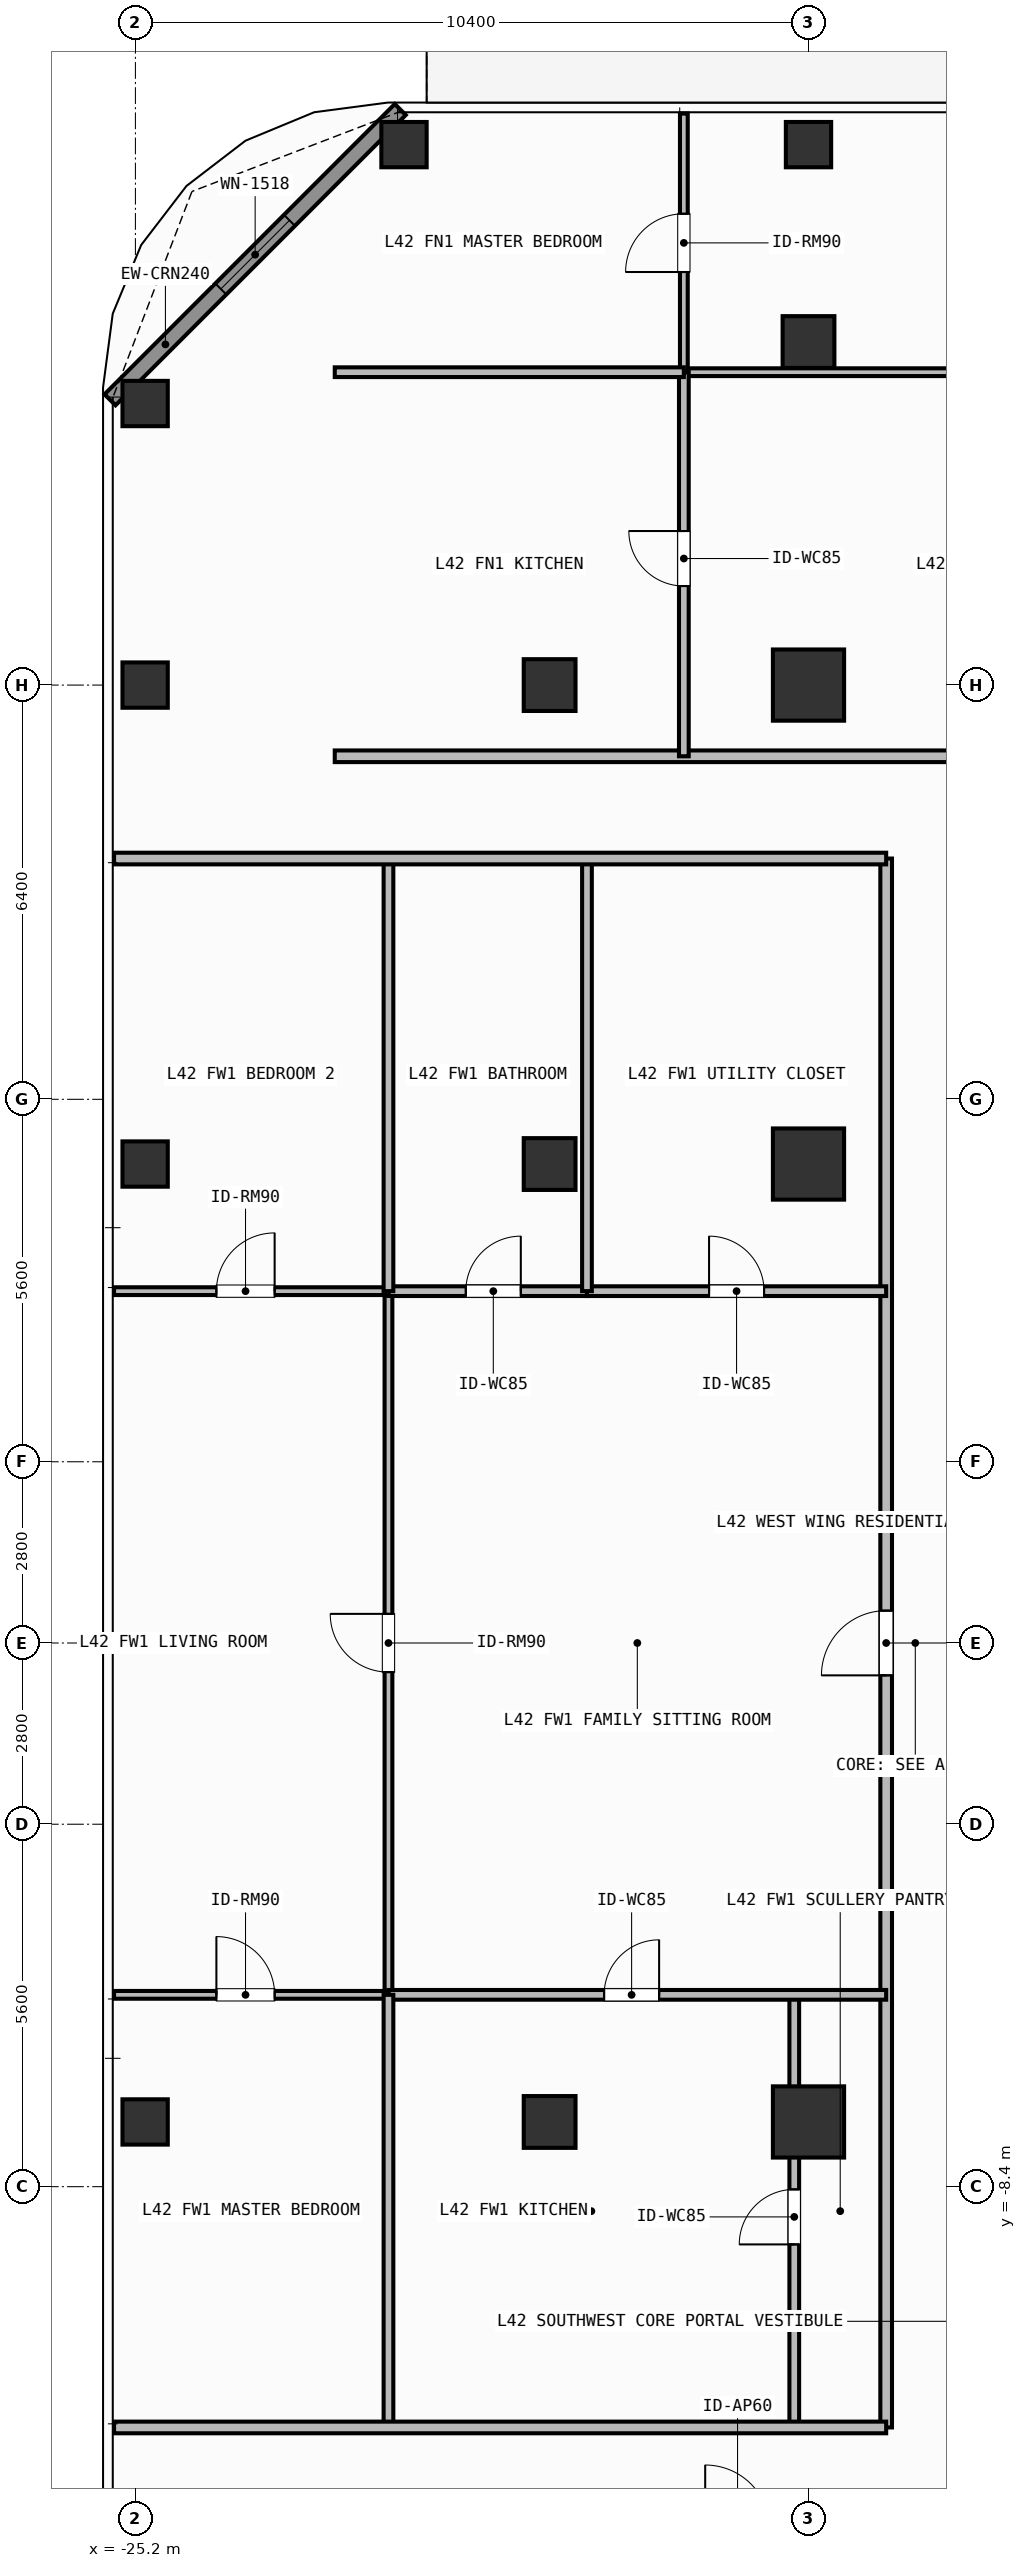
"""IFC4 building model, lengths in metres.
Left out: names, types, materials, properties, quantities, classifications, styles, units other than length and angle.
Written with IfcOpenShell. Run it as: python <this file> out.ifc"""

import sys

from ifc_helpers import new_model, si_unit, direction, frame, frame_2d, origin, origin_2d, place, context, subcontext, project, spatial, rectangle, hollow_rectangle, extrude, element, fill, save


model = new_model("IFC4")
c1 = context("Model", 3, precision=1e-05, world=origin(), true_north=direction((0.0, 1.0)))
c2 = subcontext(c1, "Body", "Model", "MODEL_VIEW")
j1 = project(units=[si_unit("LENGTHUNIT", "METRE"), si_unit("PLANEANGLEUNIT", "RADIAN")], contexts=[c1])
p1 = place(None, origin())
s1 = spatial("IfcSite", under=j1, at=p1, CompositionType="ELEMENT")
p2 = place(p1, origin())
s2 = spatial("IfcBuilding", under=s1, at=p2, CompositionType="ELEMENT")
p3 = place(p2, frame((0.0, 0.0, 171.9)))
s3 = spatial("IfcBuildingStorey", under=s2, at=p3, CompositionType="ELEMENT", Elevation=171.9)
for number, where, z_axis, x_axis in (
    (1, (-14.8, 14.8, 0.0), (0.0, 0.0, 1.0), (1.0, 0.0, 0.0)),
    (2, (-14.8, -7.4, 0.0), (0.0, 0.0, 1.0), (1.0, 0.0, 0.0)),
    (3, (-14.8, 7.4, 0.0), (0.0, 0.0, 1.0), (1.0, 0.0, 0.0)),
):
    element("IfcColumn", number, at=place(p3, frame(where, z_axis=z_axis, x_axis=x_axis)), inside=s3, PredefinedType="COLUMN", context=c2, shape_type="SweptSolid", body=[
        extrude(rectangle(XDim=1.1, YDim=1.1, at=origin_2d()), origin(), (0.0, 0.0, 1.0), 3.9),
    ])
for number, where, z_axis, x_axis in (
    (4, (-18.8, -7.4, 0.0), (0.0, 0.0, 1.0), (1.0, 0.0, 0.0)),
    (5, (-18.8, 7.4, 0.0), (0.0, 0.0, 1.0), (1.0, 0.0, 0.0)),
    (6, (-18.8, 14.8, 0.0), (0.0, 0.0, 1.0), (1.0, 0.0, 0.0)),
    (7, (-14.8, 20.1, 0.0), (0.0, 0.0, 1.0), (1.0, 0.0, 0.0)),
):
    element("IfcColumn", number, at=place(p3, frame(where, z_axis=z_axis, x_axis=x_axis)), inside=s3, PredefinedType="COLUMN", context=c2, shape_type="SweptSolid", body=[
        extrude(hollow_rectangle(XDim=0.8, YDim=0.8, WallThickness=0.036, at=origin_2d()), origin(), (0.0, 0.0, 1.0), 3.9),
    ])
for number, where, z_axis, x_axis in (
    (8, (-21.05, 23.15, 0.0), (0.0, 0.0, 1.0), (1.0, 0.0, 0.0)),
    (9, (-25.05, 19.15, 0.0), (0.0, 0.0, 1.0), (1.0, 0.0, 0.0)),
    (10, (-14.8, 23.15, 0.0), (0.0, 0.0, 1.0), (1.0, 0.0, 0.0)),
    (11, (-25.05, -7.4, 0.0), (0.0, 0.0, 1.0), (1.0, 0.0, 0.0)),
    (12, (-25.05, 7.4, 0.0), (0.0, 0.0, 1.0), (1.0, 0.0, 0.0)),
    (13, (-25.05, 14.8, 0.0), (0.0, 0.0, 1.0), (1.0, 0.0, 0.0)),
):
    element("IfcColumn", number, at=place(p3, frame(where, z_axis=z_axis, x_axis=x_axis)), inside=s3, PredefinedType="COLUMN", context=c2, shape_type="SweptSolid", body=[
        extrude(hollow_rectangle(XDim=0.7, YDim=0.7, WallThickness=0.032, at=origin_2d()), origin(), (0.0, 0.0, 1.0), 3.9),
    ])
p4 = place(p3, frame((-25.592, 19.208, 0.0), z_axis=(0.0, 0.0, 1.0), x_axis=(0.707087534163, 0.707126027686, 0.0)))
e14 = element("IfcWall", 14, at=p4, inside=s3, PredefinedType="SOLIDWALL", context=c2, shape_type="SweptSolid", body=[
    extrude(rectangle(XDim=6.342, YDim=0.24, at=frame_2d((3.171, 0.0))), origin(), (0.0, 0.0, 1.0), 3.68),
])
p5 = place(p4, frame((2.421, 0.0, 0.8)))
e15 = element("IfcOpeningElement", 15, at=p5, cuts=e14, PredefinedType="OPENING", context=c2, shape_type="SweptSolid", body=[
    extrude(rectangle(XDim=1.5, YDim=1.85, at=frame_2d((0.75, 0.925))), frame((0.0, 0.13, 0.0), z_axis=(0.0, -1.0, 0.0), x_axis=(1.0, 0.0, 0.0)), (0.0, 0.0, 1.0), 0.26),
])
p6 = place(p3, frame((-22.12, 13.7, 0.0), z_axis=(0.0, 0.0, 1.0), x_axis=(1.0, 0.0, 0.0)))
e16 = element("IfcWall", 16, at=p6, inside=s3, PredefinedType="PARTITIONING", context=c2, shape_type="SweptSolid", body=[
    extrude(rectangle(XDim=22.646, YDim=0.18, at=frame_2d((11.323, 0.0))), origin(), (0.0, 0.0, 1.0), 3.68),
])
p7 = place(p6, frame((10.554, 0.0, 0.0)))
e17 = element("IfcOpeningElement", 17, at=p7, cuts=e16, PredefinedType="OPENING", context=c2, shape_type="SweptSolid", body=[
    extrude(rectangle(XDim=1.0, YDim=2.2, at=frame_2d((0.5, 1.1))), frame((0.0, 0.1, 0.0), z_axis=(0.0, -1.0, 0.0), x_axis=(1.0, 0.0, 0.0)), (0.0, 0.0, 1.0), 0.2),
])
p8 = place(p3, frame((-16.726, 19.634, 0.0), z_axis=(0.0, 0.0, 1.0), x_axis=(1.0, 0.0, 0.0)))
e18 = element("IfcWall", 18, at=p8, inside=s3, PredefinedType="PARTITIONING", context=c2, shape_type="SweptSolid", body=[
    extrude(rectangle(XDim=11.298, YDim=0.12, at=frame_2d((5.649, 0.0))), origin(), (0.0, 0.0, 1.0), 3.68),
])
p9 = place(p8, frame((5.199, 0.0, 0.0)))
e19 = element("IfcOpeningElement", 19, at=p9, cuts=e18, PredefinedType="OPENING", context=c2, shape_type="SweptSolid", body=[
    extrude(rectangle(XDim=0.9, YDim=2.1, at=frame_2d((0.45, 1.05))), frame((0.0, 0.07, 0.0), z_axis=(0.0, -1.0, 0.0), x_axis=(1.0, 0.0, 0.0)), (0.0, 0.0, 1.0), 0.14),
])
p10 = place(p3, frame((-16.726, 13.7, 0.0), z_axis=(0.0, 0.0, 1.0), x_axis=(0.0, 1.0, 0.0)))
e20 = element("IfcWall", 20, at=p10, inside=s3, PredefinedType="PARTITIONING", context=c2, shape_type="SweptSolid", body=[
    extrude(rectangle(XDim=5.934, YDim=0.15, at=frame_2d((2.967, 0.0))), origin(), (0.0, 0.0, 1.0), 3.68),
])
p11 = place(p10, frame((2.63, 0.0, 0.0)))
e21 = element("IfcOpeningElement", 21, at=p11, cuts=e20, PredefinedType="OPENING", context=c2, shape_type="SweptSolid", body=[
    extrude(rectangle(XDim=0.85, YDim=2.1, at=frame_2d((0.425, 1.05))), frame((0.0, 0.085, 0.0), z_axis=(0.0, -1.0, 0.0), x_axis=(1.0, 0.0, 0.0)), (0.0, 0.0, 1.0), 0.17),
])
p12 = place(p3, frame((-16.726, 19.634, 0.0), z_axis=(0.0, 0.0, 1.0), x_axis=(0.0, 1.0, 0.0)))
e22 = element("IfcWall", 22, at=p12, inside=s3, PredefinedType="PARTITIONING", context=c2, shape_type="SweptSolid", body=[
    extrude(rectangle(XDim=3.996, YDim=0.12, at=frame_2d((1.998, 0.0))), origin(), (0.0, 0.0, 1.0), 3.68),
])
p13 = place(p12, frame((1.548, 0.0, 0.0)))
e23 = element("IfcOpeningElement", 23, at=p13, cuts=e22, PredefinedType="OPENING", context=c2, shape_type="SweptSolid", body=[
    extrude(rectangle(XDim=0.9, YDim=2.1, at=frame_2d((0.45, 1.05))), frame((0.0, 0.07, 0.0), z_axis=(0.0, -1.0, 0.0), x_axis=(1.0, 0.0, 0.0)), (0.0, 0.0, 1.0), 0.14),
])
p14 = place(p3, frame((-13.6, -12.12, 0.0), z_axis=(0.0, 0.0, 1.0), x_axis=(0.0, 1.0, 0.0)))
e24 = element("IfcWall", 24, at=p14, inside=s3, PredefinedType="PARTITIONING", context=c2, shape_type="SweptSolid", body=[
    extrude(rectangle(XDim=24.24, YDim=0.18, at=frame_2d((12.12, 0.0))), origin(), (0.0, 0.0, 1.0), 3.68),
])
p15 = place(p14, frame((11.62, 0.0, 0.0)))
e25 = element("IfcOpeningElement", 25, at=p15, cuts=e24, PredefinedType="OPENING", context=c2, shape_type="SweptSolid", body=[
    extrude(rectangle(XDim=1.0, YDim=2.2, at=frame_2d((0.5, 1.1))), frame((0.0, 0.1, 0.0), z_axis=(0.0, -1.0, 0.0), x_axis=(1.0, 0.0, 0.0)), (0.0, 0.0, 1.0), 0.2),
])
p16 = place(p3, frame((-21.29, -5.436, 0.0), z_axis=(0.0, 0.0, 1.0), x_axis=(0.0, 1.0, 0.0)))
e26 = element("IfcWall", 26, at=p16, inside=s3, PredefinedType="PARTITIONING", context=c2, shape_type="SweptSolid", body=[
    extrude(rectangle(XDim=10.872, YDim=0.12, at=frame_2d((5.436, 0.0))), origin(), (0.0, 0.0, 1.0), 3.68),
])
p17 = place(p16, frame((4.986, 0.0, 0.0)))
e27 = element("IfcOpeningElement", 27, at=p17, cuts=e26, PredefinedType="OPENING", context=c2, shape_type="SweptSolid", body=[
    extrude(rectangle(XDim=0.9, YDim=2.1, at=frame_2d((0.45, 1.05))), frame((0.0, 0.07, 0.0), z_axis=(0.0, -1.0, 0.0), x_axis=(1.0, 0.0, 0.0)), (0.0, 0.0, 1.0), 0.14),
])
p18 = place(p3, frame((-15.02, -12.12, 0.0), z_axis=(0.0, 0.0, 1.0), x_axis=(0.0, 1.0, 0.0)))
e28 = element("IfcWall", 28, at=p18, inside=s3, PredefinedType="PARTITIONING", context=c2, shape_type="SweptSolid", body=[
    extrude(rectangle(XDim=6.684, YDim=0.15, at=frame_2d((3.342, 0.0))), origin(), (0.0, 0.0, 1.0), 3.082),
])
p19 = place(p18, frame((2.828, 0.0, 0.0)))
e29 = element("IfcOpeningElement", 29, at=p19, cuts=e28, PredefinedType="OPENING", context=c2, shape_type="SweptSolid", body=[
    extrude(rectangle(XDim=0.85, YDim=2.1, at=frame_2d((0.425, 1.05))), frame((0.0, 0.085, 0.0), z_axis=(0.0, -1.0, 0.0), x_axis=(1.0, 0.0, 0.0)), (0.0, 0.0, 1.0), 0.17),
])
p20 = place(p3, frame((-21.29, 5.436, 0.0), z_axis=(0.0, 0.0, 1.0), x_axis=(1.0, 0.0, 0.0)))
e30 = element("IfcWall", 30, at=p20, inside=s3, PredefinedType="PARTITIONING", context=c2, shape_type="SweptSolid", body=[
    extrude(rectangle(XDim=3.067, YDim=0.15, at=frame_2d((1.534, 0.0))), origin(), (0.0, 0.0, 1.0), 3.68),
])
p21 = place(p20, frame((1.195, 0.0, 0.0)))
e31 = element("IfcOpeningElement", 31, at=p21, cuts=e30, PredefinedType="OPENING", context=c2, shape_type="SweptSolid", body=[
    extrude(rectangle(XDim=0.85, YDim=2.1, at=frame_2d((0.425, 1.05))), frame((0.0, 0.085, 0.0), z_axis=(0.0, -1.0, 0.0), x_axis=(1.0, 0.0, 0.0)), (0.0, 0.0, 1.0), 0.17),
])
p22 = place(p3, frame((-18.223, 5.436, 0.0), z_axis=(0.0, 0.0, 1.0), x_axis=(1.0, 0.0, 0.0)))
e32 = element("IfcWall", 32, at=p22, inside=s3, PredefinedType="PARTITIONING", context=c2, shape_type="SweptSolid", body=[
    extrude(rectangle(XDim=4.623, YDim=0.15, at=frame_2d((2.312, 0.0))), origin(), (0.0, 0.0, 1.0), 3.68),
])
p23 = place(p22, frame((1.886, 0.0, 0.0)))
e33 = element("IfcOpeningElement", 33, at=p23, cuts=e32, PredefinedType="OPENING", context=c2, shape_type="SweptSolid", body=[
    extrude(rectangle(XDim=0.85, YDim=2.1, at=frame_2d((0.425, 1.05))), frame((0.0, 0.085, 0.0), z_axis=(0.0, -1.0, 0.0), x_axis=(1.0, 0.0, 0.0)), (0.0, 0.0, 1.0), 0.17),
])
p24 = place(p3, frame((-21.29, -5.436, 0.0), z_axis=(0.0, 0.0, 1.0), x_axis=(1.0, 0.0, 0.0)))
e34 = element("IfcWall", 34, at=p24, inside=s3, PredefinedType="PARTITIONING", context=c2, shape_type="SweptSolid", body=[
    extrude(rectangle(XDim=7.69, YDim=0.15, at=frame_2d((3.845, 0.0))), origin(), (0.0, 0.0, 1.0), 3.68),
])
p25 = place(p24, frame((3.332, 0.0, 0.0)))
e35 = element("IfcOpeningElement", 35, at=p25, cuts=e34, PredefinedType="OPENING", context=c2, shape_type="SweptSolid", body=[
    extrude(rectangle(XDim=0.85, YDim=2.1, at=frame_2d((0.425, 1.05))), frame((0.0, 0.085, 0.0), z_axis=(0.0, -1.0, 0.0), x_axis=(1.0, 0.0, 0.0)), (0.0, 0.0, 1.0), 0.17),
])
p26 = place(p3, frame((-25.53, -5.436, 0.0), z_axis=(0.0, 0.0, 1.0), x_axis=(1.0, 0.0, 0.0)))
e36 = element("IfcWall", 36, at=p26, inside=s3, PredefinedType="PARTITIONING", context=c2, shape_type="SweptSolid", body=[
    extrude(rectangle(XDim=4.24, YDim=0.12, at=frame_2d((2.12, 0.0))), origin(), (0.0, 0.0, 1.0), 3.68),
])
p27 = place(p26, frame((1.581, 0.0, 0.0)))
e37 = element("IfcOpeningElement", 37, at=p27, cuts=e36, PredefinedType="OPENING", context=c2, shape_type="SweptSolid", body=[
    extrude(rectangle(XDim=0.9, YDim=2.1, at=frame_2d((0.45, 1.05))), frame((0.0, 0.07, 0.0), z_axis=(0.0, -1.0, 0.0), x_axis=(1.0, 0.0, 0.0)), (0.0, 0.0, 1.0), 0.14),
])
p28 = place(p3, frame((-25.53, 5.436, 0.0), z_axis=(0.0, 0.0, 1.0), x_axis=(1.0, 0.0, 0.0)))
e38 = element("IfcWall", 38, at=p28, inside=s3, PredefinedType="PARTITIONING", context=c2, shape_type="SweptSolid", body=[
    extrude(rectangle(XDim=4.24, YDim=0.12, at=frame_2d((2.12, 0.0))), origin(), (0.0, 0.0, 1.0), 3.68),
])
p29 = place(p28, frame((1.581, 0.0, 0.0)))
e39 = element("IfcOpeningElement", 39, at=p29, cuts=e38, PredefinedType="OPENING", context=c2, shape_type="SweptSolid", body=[
    extrude(rectangle(XDim=0.9, YDim=2.1, at=frame_2d((0.45, 1.05))), frame((0.0, 0.07, 0.0), z_axis=(0.0, -1.0, 0.0), x_axis=(1.0, 0.0, 0.0)), (0.0, 0.0, 1.0), 0.14),
])
p30 = place(p3, frame((-22.12, 19.634, 0.0), z_axis=(0.0, 0.0, 1.0), x_axis=(1.0, 0.0, 0.0)))
e40 = element("IfcWall", 40, at=p30, inside=s3, PredefinedType="PARTITIONING", context=c2, shape_type="SweptSolid", body=[
    extrude(rectangle(XDim=5.394, YDim=0.15, at=frame_2d((2.697, 0.0))), origin(), (0.0, 0.0, 1.0), 3.68),
])
for number, where, z_axis, x_axis in (
    (41, (-18.223, 5.436, 0.0), (0.0, 0.0, 1.0), (0.0, 1.0, 0.0)),
    (42, (-21.29, -12.12, 0.0), (0.0, 0.0, 1.0), (0.0, 1.0, 0.0)),
    (43, (-21.29, 5.436, 0.0), (0.0, 0.0, 1.0), (0.0, 1.0, 0.0)),
):
    element("IfcWall", number, at=place(p3, frame(where, z_axis=z_axis, x_axis=x_axis)), inside=s3, PredefinedType="PARTITIONING", context=c2, shape_type="SweptSolid", body=[
        extrude(rectangle(XDim=6.684, YDim=0.15, at=frame_2d((3.342, 0.0))), origin(), (0.0, 0.0, 1.0), 3.68),
    ])
for number, where, z_axis, x_axis in (
    (44, (-25.53, -12.12, 0.0), (0.0, 0.0, 1.0), (1.0, 0.0, 0.0)),
    (45, (-25.53, 12.12, 0.0), (0.0, 0.0, 1.0), (1.0, 0.0, 0.0)),
):
    element("IfcWall", number, at=place(p3, frame(where, z_axis=z_axis, x_axis=x_axis)), inside=s3, PredefinedType="PARTITIONING", context=c2, shape_type="SweptSolid", body=[
        extrude(rectangle(XDim=11.93, YDim=0.18, at=frame_2d((5.965, 0.0))), origin(), (0.0, 0.0, 1.0), 3.68),
    ])
p31 = place(p5, origin())
e46 = element("IfcWindow", 46, at=p31, inside=s3, PartitioningType="SINGLE_PANEL", PredefinedType="WINDOW", context=c2, shape_type="SweptSolid", body=[
    extrude(rectangle(XDim=1.5, YDim=1.85, at=frame_2d((0.75, 0.925))), frame((0.0, 0.03, 0.0), z_axis=(0.0, -1.0, 0.0), x_axis=(1.0, 0.0, 0.0)), (0.0, 0.0, 1.0), 0.06),
])
fill(e15, e46)
p32 = place(p11, origin())
e47 = element("IfcDoor", 47, at=p32, inside=s3, OperationType="SINGLE_SWING_RIGHT", PredefinedType="DOOR", context=c2, shape_type="SweptSolid", body=[
    extrude(rectangle(XDim=0.85, YDim=2.1, at=frame_2d((0.425, 1.05))), frame((0.0, 0.025, 0.0), z_axis=(0.0, -1.0, 0.0), x_axis=(1.0, 0.0, 0.0)), (0.0, 0.0, 1.0), 0.05),
])
fill(e21, e47)
p33 = place(p13, origin())
e48 = element("IfcDoor", 48, at=p33, inside=s3, OperationType="SINGLE_SWING_LEFT", PredefinedType="DOOR", context=c2, shape_type="SweptSolid", body=[
    extrude(rectangle(XDim=0.9, YDim=2.1, at=frame_2d((0.45, 1.05))), frame((0.0, 0.025, 0.0), z_axis=(0.0, -1.0, 0.0), x_axis=(1.0, 0.0, 0.0)), (0.0, 0.0, 1.0), 0.05),
])
fill(e23, e48)
p34 = place(p15, origin())
e49 = element("IfcDoor", 49, at=p34, inside=s3, OperationType="SINGLE_SWING_LEFT", PredefinedType="DOOR", context=c2, shape_type="SweptSolid", body=[
    extrude(rectangle(XDim=1.0, YDim=2.2, at=frame_2d((0.5, 1.1))), frame((0.0, 0.025, 0.0), z_axis=(0.0, -1.0, 0.0), x_axis=(1.0, 0.0, 0.0)), (0.0, 0.0, 1.0), 0.05),
])
fill(e25, e49)
p35 = place(p17, origin())
e50 = element("IfcDoor", 50, at=p35, inside=s3, OperationType="SINGLE_SWING_RIGHT", PredefinedType="DOOR", context=c2, shape_type="SweptSolid", body=[
    extrude(rectangle(XDim=0.9, YDim=2.1, at=frame_2d((0.45, 1.05))), frame((0.0, 0.025, 0.0), z_axis=(0.0, -1.0, 0.0), x_axis=(1.0, 0.0, 0.0)), (0.0, 0.0, 1.0), 0.05),
])
fill(e27, e50)
p36 = place(p19, origin())
e51 = element("IfcDoor", 51, at=p36, inside=s3, OperationType="SINGLE_SWING_LEFT", PredefinedType="DOOR", context=c2, shape_type="SweptSolid", body=[
    extrude(rectangle(XDim=0.85, YDim=2.1, at=frame_2d((0.425, 1.05))), frame((0.0, 0.025, 0.0), z_axis=(0.0, -1.0, 0.0), x_axis=(1.0, 0.0, 0.0)), (0.0, 0.0, 1.0), 0.05),
])
fill(e29, e51)
p37 = place(p21, origin())
e52 = element("IfcDoor", 52, at=p37, inside=s3, OperationType="SINGLE_SWING_RIGHT", PredefinedType="DOOR", context=c2, shape_type="SweptSolid", body=[
    extrude(rectangle(XDim=0.85, YDim=2.1, at=frame_2d((0.425, 1.05))), frame((0.0, 0.025, 0.0), z_axis=(0.0, -1.0, 0.0), x_axis=(1.0, 0.0, 0.0)), (0.0, 0.0, 1.0), 0.05),
])
fill(e31, e52)
p38 = place(p23, origin())
e53 = element("IfcDoor", 53, at=p38, inside=s3, OperationType="SINGLE_SWING_LEFT", PredefinedType="DOOR", context=c2, shape_type="SweptSolid", body=[
    extrude(rectangle(XDim=0.85, YDim=2.1, at=frame_2d((0.425, 1.05))), frame((0.0, 0.025, 0.0), z_axis=(0.0, -1.0, 0.0), x_axis=(1.0, 0.0, 0.0)), (0.0, 0.0, 1.0), 0.05),
])
fill(e33, e53)
p39 = place(p25, origin())
e54 = element("IfcDoor", 54, at=p39, inside=s3, OperationType="SINGLE_SWING_RIGHT", PredefinedType="DOOR", context=c2, shape_type="SweptSolid", body=[
    extrude(rectangle(XDim=0.85, YDim=2.1, at=frame_2d((0.425, 1.05))), frame((0.0, 0.025, 0.0), z_axis=(0.0, -1.0, 0.0), x_axis=(1.0, 0.0, 0.0)), (0.0, 0.0, 1.0), 0.05),
])
fill(e35, e54)
p40 = place(p27, origin())
e55 = element("IfcDoor", 55, at=p40, inside=s3, OperationType="SINGLE_SWING_LEFT", PredefinedType="DOOR", context=c2, shape_type="SweptSolid", body=[
    extrude(rectangle(XDim=0.9, YDim=2.1, at=frame_2d((0.45, 1.05))), frame((0.0, 0.025, 0.0), z_axis=(0.0, -1.0, 0.0), x_axis=(1.0, 0.0, 0.0)), (0.0, 0.0, 1.0), 0.05),
])
fill(e37, e55)
p41 = place(p29, origin())
e56 = element("IfcDoor", 56, at=p41, inside=s3, OperationType="SINGLE_SWING_RIGHT", PredefinedType="DOOR", context=c2, shape_type="SweptSolid", body=[
    extrude(rectangle(XDim=0.9, YDim=2.1, at=frame_2d((0.45, 1.05))), frame((0.0, 0.025, 0.0), z_axis=(0.0, -1.0, 0.0), x_axis=(1.0, 0.0, 0.0)), (0.0, 0.0, 1.0), 0.05),
])
fill(e39, e56)
save(model, sys.argv[1])
